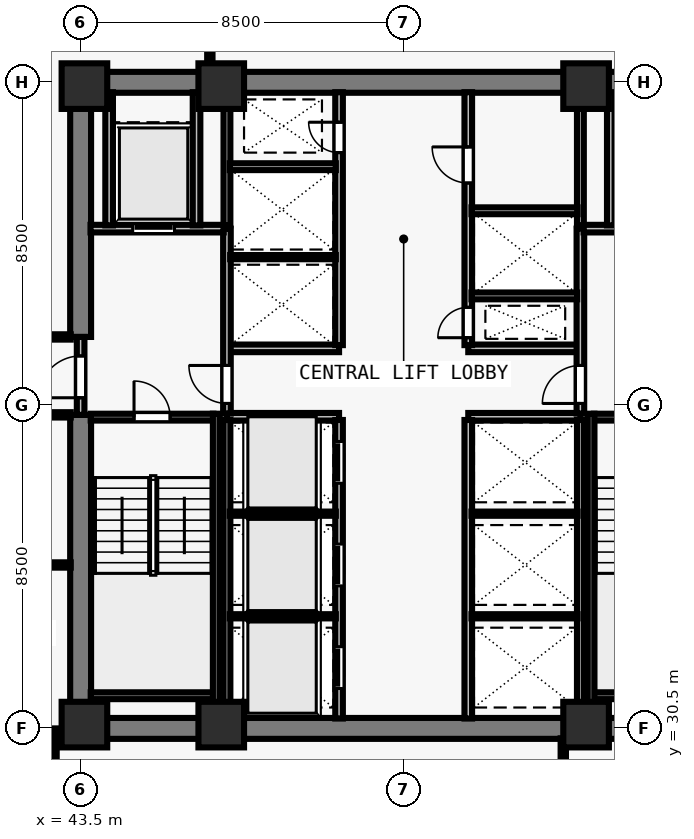
"""IFC4 building model, lengths in metres.
Left out: names, types, materials, properties, quantities, classifications, styles, units other than length and angle.
Written with IfcOpenShell. Run it as: python <this file> out.ifc"""

import sys

from ifc_helpers import new_model, si_unit, direction, frame, frame_2d, origin, origin_2d, place, context, subcontext, project, spatial, rectangle, extrude, element, fill, save


model = new_model("IFC4")
c1 = context("Model", 3, precision=1e-05, world=origin(), true_north=direction((0.0, 1.0)))
c2 = subcontext(c1, "Body", "Model", "MODEL_VIEW")
j1 = project(units=[si_unit("LENGTHUNIT", "METRE"), si_unit("PLANEANGLEUNIT", "RADIAN")], contexts=[c1])
p1 = place(None, origin())
s1 = spatial("IfcSite", under=j1, at=p1, CompositionType="ELEMENT")
p2 = place(p1, origin())
s2 = spatial("IfcBuilding", under=s1, at=p2, CompositionType="ELEMENT")
p3 = place(p2, frame((0.0, 0.0, 72.5)))
s3 = spatial("IfcBuildingStorey", under=s2, at=p3, CompositionType="ELEMENT", Elevation=72.5)
for number, where, z_axis, x_axis in (
    (1, (43.6, 30.6, 0.0), (0.0, 0.0, 1.0), (1.0, 0.0, 0.0)),
    (2, (47.2, 30.6, 0.0), (0.0, 0.0, 1.0), (1.0, 0.0, 0.0)),
    (3, (56.8, 30.6, 0.0), (0.0, 0.0, 1.0), (1.0, 0.0, 0.0)),
    (4, (43.6, 47.4, 0.0), (0.0, 0.0, 1.0), (1.0, 0.0, 0.0)),
    (5, (47.2, 47.4, 0.0), (0.0, 0.0, 1.0), (1.0, 0.0, 0.0)),
    (6, (56.8, 47.4, 0.0), (0.0, 0.0, 1.0), (1.0, 0.0, 0.0)),
):
    element("IfcColumn", number, at=place(p3, frame(where, z_axis=z_axis, x_axis=x_axis)), inside=s3, PredefinedType="COLUMN", context=c2, shape_type="SweptSolid", body=[
        extrude(rectangle(XDim=1.2, YDim=1.2, at=origin_2d()), origin(), (0.0, 0.0, 1.0), 3.5),
    ])
for number, where, z_axis, x_axis in (
    (7, (43.225, 30.5, 0.0), (0.0, 0.0, 1.0), (1.0, 0.0, 0.0)),
    (8, (43.225, 47.5, 0.0), (0.0, 0.0, 1.0), (1.0, 0.0, 0.0)),
):
    element("IfcWall", number, at=place(p3, frame(where, z_axis=z_axis, x_axis=x_axis)), inside=s3, PredefinedType="SHEAR", context=c2, shape_type="SweptSolid", body=[
        extrude(rectangle(XDim=17.55, YDim=0.55, at=frame_2d((8.775, 0.0))), origin(), (0.0, 0.0, 1.0), 3.28),
    ])
p4 = place(p3, frame((43.5, 30.765, 0.0), z_axis=(0.0, 0.0, 1.0), x_axis=(0.0, 1.0, 0.0)))
e9 = element("IfcWall", 9, at=p4, inside=s3, PredefinedType="SHEAR", context=c2, shape_type="SweptSolid", body=[
    extrude(rectangle(XDim=7.985, YDim=0.55, at=frame_2d((3.993, 0.0))), origin(), (0.0, 0.0, 1.0), 3.28),
])
p5 = place(p3, frame((43.5, 40.8, 0.0), z_axis=(0.0, 0.0, 1.0), x_axis=(0.0, 1.0, 0.0)))
e10 = element("IfcWall", 10, at=p5, inside=s3, PredefinedType="SHEAR", context=c2, shape_type="SweptSolid", body=[
    extrude(rectangle(XDim=6.435, YDim=0.55, at=frame_2d((3.218, 0.0))), origin(), (0.0, 0.0, 1.0), 3.28),
])
for number, where, z_axis, x_axis in (
    (11, (47.35, 38.7, 0.0), (0.0, 0.0, 1.0), (1.0, 0.0, 0.0)),
    (12, (47.35, 40.5, 0.0), (0.0, 0.0, 1.0), (1.0, 0.0, 0.0)),
    (13, (53.7, 38.7, 0.0), (0.0, 0.0, 1.0), (1.0, 0.0, 0.0)),
    (14, (53.7, 40.5, 0.0), (0.0, 0.0, 1.0), (1.0, 0.0, 0.0)),
):
    element("IfcWall", number, at=place(p3, frame(where, z_axis=z_axis, x_axis=x_axis)), inside=s3, PredefinedType="SOLIDWALL", context=c2, shape_type="SweptSolid", body=[
        extrude(rectangle(XDim=2.95, YDim=0.2, at=frame_2d((1.475, 0.0))), origin(), (0.0, 0.0, 1.0), 3.28),
    ])
p6 = place(p3, frame((50.3, 30.76, 0.0), z_axis=(0.0, 0.0, 1.0), x_axis=(0.0, 1.0, 0.0)))
e15 = element("IfcWall", 15, at=p6, inside=s3, PredefinedType="SOLIDWALL", context=c2, shape_type="SweptSolid", body=[
    extrude(rectangle(XDim=7.855, YDim=0.2, at=frame_2d((3.927, 0.0))), origin(), (0.0, 0.0, 1.0), 3.28),
])
p7 = place(p6, frame((0.79, 0.0, 0.0)))
e16 = element("IfcOpeningElement", 16, at=p7, cuts=e15, PredefinedType="OPENING", context=c2, shape_type="SweptSolid", body=[
    extrude(rectangle(XDim=1.1, YDim=2.2, at=frame_2d((0.55, 1.1))), frame((0.0, 0.11, 0.0), z_axis=(0.0, -1.0, 0.0), x_axis=(1.0, 0.0, 0.0)), (0.0, 0.0, 1.0), 0.22),
])
p8 = place(p6, frame((3.49, 0.0, 0.0)))
e17 = element("IfcOpeningElement", 17, at=p8, cuts=e15, PredefinedType="OPENING", context=c2, shape_type="SweptSolid", body=[
    extrude(rectangle(XDim=1.1, YDim=2.2, at=frame_2d((0.55, 1.1))), frame((0.0, 0.11, 0.0), z_axis=(0.0, -1.0, 0.0), x_axis=(1.0, 0.0, 0.0)), (0.0, 0.0, 1.0), 0.22),
])
p9 = place(p6, frame((6.19, 0.0, 0.0)))
e18 = element("IfcOpeningElement", 18, at=p9, cuts=e15, PredefinedType="OPENING", context=c2, shape_type="SweptSolid", body=[
    extrude(rectangle(XDim=1.1, YDim=2.2, at=frame_2d((0.55, 1.1))), frame((0.0, 0.11, 0.0), z_axis=(0.0, -1.0, 0.0), x_axis=(1.0, 0.0, 0.0)), (0.0, 0.0, 1.0), 0.22),
])
p10 = place(p3, frame((53.7, 30.76, 0.0), z_axis=(0.0, 0.0, 1.0), x_axis=(0.0, 1.0, 0.0)))
e19 = element("IfcWall", 19, at=p10, inside=s3, PredefinedType="SOLIDWALL", context=c2, shape_type="SweptSolid", body=[
    extrude(rectangle(XDim=7.855, YDim=0.2, at=frame_2d((3.927, 0.0))), origin(), (0.0, 0.0, 1.0), 3.28),
])
p11 = place(p3, frame((50.3, 40.585, 0.0), z_axis=(0.0, 0.0, 1.0), x_axis=(0.0, 1.0, 0.0)))
e20 = element("IfcWall", 20, at=p11, inside=s3, PredefinedType="SOLIDWALL", context=c2, shape_type="SweptSolid", body=[
    extrude(rectangle(XDim=6.655, YDim=0.2, at=frame_2d((3.328, 0.0))), origin(), (0.0, 0.0, 1.0), 3.28),
])
p12 = place(p11, frame((5.065, 0.0, 0.0)))
e21 = element("IfcOpeningElement", 21, at=p12, cuts=e20, PredefinedType="OPENING", context=c2, shape_type="SweptSolid", body=[
    extrude(rectangle(XDim=0.8, YDim=2.08, at=frame_2d((0.4, 1.04))), frame((0.0, 0.11, 0.0), z_axis=(0.0, -1.0, 0.0), x_axis=(1.0, 0.0, 0.0)), (0.0, 0.0, 1.0), 0.22),
])
p13 = place(p3, frame((53.7, 40.585, 0.0), z_axis=(0.0, 0.0, 1.0), x_axis=(0.0, 1.0, 0.0)))
e22 = element("IfcWall", 22, at=p13, inside=s3, PredefinedType="SOLIDWALL", context=c2, shape_type="SweptSolid", body=[
    extrude(rectangle(XDim=6.655, YDim=0.2, at=frame_2d((3.328, 0.0))), origin(), (0.0, 0.0, 1.0), 3.28),
])
p14 = place(p13, frame((0.195, 0.0, 0.0)))
e23 = element("IfcOpeningElement", 23, at=p14, cuts=e22, PredefinedType="OPENING", context=c2, shape_type="SweptSolid", body=[
    extrude(rectangle(XDim=0.8, YDim=2.08, at=frame_2d((0.4, 1.04))), frame((0.0, 0.11, 0.0), z_axis=(0.0, -1.0, 0.0), x_axis=(1.0, 0.0, 0.0)), (0.0, 0.0, 1.0), 0.22),
])
p15 = place(p13, frame((4.265, 0.0, 0.0)))
e24 = element("IfcOpeningElement", 24, at=p15, cuts=e22, PredefinedType="OPENING", context=c2, shape_type="SweptSolid", body=[
    extrude(rectangle(XDim=0.95, YDim=2.12, at=frame_2d((0.475, 1.06))), frame((0.0, 0.11, 0.0), z_axis=(0.0, -1.0, 0.0), x_axis=(1.0, 0.0, 0.0)), (0.0, 0.0, 1.0), 0.22),
])
p16 = place(p3, frame((43.5, 38.75, 0.0), z_axis=(0.0, 0.0, 1.0), x_axis=(0.0, 1.0, 0.0)))
e25 = element("IfcWall", 25, at=p16, inside=s3, PredefinedType="SOLIDWALL", context=c2, shape_type="SweptSolid", body=[
    extrude(rectangle(XDim=2.05, YDim=0.2, at=frame_2d((1.025, 0.0))), origin(), (0.0, 0.0, 1.0), 3.28),
])
p17 = place(p16, frame((0.45, 0.0, 0.0)))
e26 = element("IfcOpeningElement", 26, at=p17, cuts=e25, PredefinedType="OPENING", context=c2, shape_type="SweptSolid", body=[
    extrude(rectangle(XDim=1.1, YDim=2.15, at=frame_2d((0.55, 1.075))), frame((0.0, 0.11, 0.0), z_axis=(0.0, -1.0, 0.0), x_axis=(1.0, 0.0, 0.0)), (0.0, 0.0, 1.0), 0.22),
])
p18 = place(p3, frame((47.35, 38.785, 0.0), z_axis=(0.0, 0.0, 1.0), x_axis=(0.0, 1.0, 0.0)))
e27 = element("IfcWall", 27, at=p18, inside=s3, PredefinedType="SOLIDWALL", context=c2, shape_type="SweptSolid", body=[
    extrude(rectangle(XDim=4.865, YDim=0.2, at=frame_2d((2.433, 0.0))), origin(), (0.0, 0.0, 1.0), 3.28),
])
p19 = place(p18, frame((0.265, 0.0, 0.0)))
e28 = element("IfcOpeningElement", 28, at=p19, cuts=e27, PredefinedType="OPENING", context=c2, shape_type="SweptSolid", body=[
    extrude(rectangle(XDim=1.0, YDim=2.15, at=frame_2d((0.5, 1.075))), frame((0.0, 0.11, 0.0), z_axis=(0.0, -1.0, 0.0), x_axis=(1.0, 0.0, 0.0)), (0.0, 0.0, 1.0), 0.22),
])
p20 = place(p3, frame((43.76, 43.65, 0.0), z_axis=(0.0, 0.0, 1.0), x_axis=(1.0, 0.0, 0.0)))
e29 = element("IfcWall", 29, at=p20, inside=s3, PredefinedType="SOLIDWALL", context=c2, shape_type="SweptSolid", body=[
    extrude(rectangle(XDim=3.505, YDim=0.2, at=frame_2d((1.752, 0.0))), origin(), (0.0, 0.0, 1.0), 3.28),
])
p21 = place(p20, frame((1.11, 0.0, 0.0)))
e30 = element("IfcOpeningElement", 30, at=p21, cuts=e29, PredefinedType="OPENING", context=c2, shape_type="SweptSolid", body=[
    extrude(rectangle(XDim=1.1, YDim=2.2, at=frame_2d((0.55, 1.1))), frame((0.0, 0.11, 0.0), z_axis=(0.0, -1.0, 0.0), x_axis=(1.0, 0.0, 0.0)), (0.0, 0.0, 1.0), 0.22),
])
for number, where, z_axis, x_axis in (
    (31, (46.55, 43.735, 0.0), (0.0, 0.0, 1.0), (0.0, 1.0, 0.0)),
    (32, (44.25, 43.735, 0.0), (0.0, 0.0, 1.0), (0.0, 1.0, 0.0)),
):
    element("IfcWall", number, at=place(p3, frame(where, z_axis=z_axis, x_axis=x_axis)), inside=s3, PredefinedType="SOLIDWALL", context=c2, shape_type="SweptSolid", body=[
        extrude(rectangle(XDim=3.505, YDim=0.2, at=frame_2d((1.752, 0.0))), origin(), (0.0, 0.0, 1.0), 3.28),
    ])
p22 = place(p3, frame((56.65, 38.785, 0.0), z_axis=(0.0, 0.0, 1.0), x_axis=(0.0, 1.0, 0.0)))
e33 = element("IfcWall", 33, at=p22, inside=s3, PredefinedType="SOLIDWALL", context=c2, shape_type="SweptSolid", body=[
    extrude(rectangle(XDim=4.865, YDim=0.2, at=frame_2d((2.433, 0.0))), origin(), (0.0, 0.0, 1.0), 3.28),
])
p23 = place(p22, frame((0.265, 0.0, 0.0)))
e34 = element("IfcOpeningElement", 34, at=p23, cuts=e33, PredefinedType="OPENING", context=c2, shape_type="SweptSolid", body=[
    extrude(rectangle(XDim=1.0, YDim=2.15, at=frame_2d((0.5, 1.075))), frame((0.0, 0.11, 0.0), z_axis=(0.0, -1.0, 0.0), x_axis=(1.0, 0.0, 0.0)), (0.0, 0.0, 1.0), 0.22),
])
p24 = place(p3, frame((56.735, 43.65, 0.0), z_axis=(0.0, 0.0, 1.0), x_axis=(1.0, 0.0, 0.0)))
e35 = element("IfcWall", 35, at=p24, inside=s3, PredefinedType="SOLIDWALL", context=c2, shape_type="SweptSolid", body=[
    extrude(rectangle(XDim=3.505, YDim=0.2, at=frame_2d((1.752, 0.0))), origin(), (0.0, 0.0, 1.0), 3.28),
])
p25 = place(p24, frame((1.295, 0.0, 0.0)))
e36 = element("IfcOpeningElement", 36, at=p25, cuts=e35, PredefinedType="OPENING", context=c2, shape_type="SweptSolid", body=[
    extrude(rectangle(XDim=1.1, YDim=2.2, at=frame_2d((0.55, 1.1))), frame((0.0, 0.11, 0.0), z_axis=(0.0, -1.0, 0.0), x_axis=(1.0, 0.0, 0.0)), (0.0, 0.0, 1.0), 0.22),
])
p26 = place(p3, frame((57.45, 43.735, 0.0), z_axis=(0.0, 0.0, 1.0), x_axis=(0.0, 1.0, 0.0)))
e37 = element("IfcWall", 37, at=p26, inside=s3, PredefinedType="SOLIDWALL", context=c2, shape_type="SweptSolid", body=[
    extrude(rectangle(XDim=3.505, YDim=0.2, at=frame_2d((1.752, 0.0))), origin(), (0.0, 0.0, 1.0), 3.28),
])
p27 = place(p3, frame((47.35, 30.76, 0.0), z_axis=(0.0, 0.0, 1.0), x_axis=(0.0, 1.0, 0.0)))
e38 = element("IfcWall", 38, at=p27, inside=s3, PredefinedType="SOLIDWALL", context=c2, shape_type="SweptSolid", body=[
    extrude(rectangle(XDim=7.855, YDim=0.18, at=frame_2d((3.927, 0.0))), origin(), (0.0, 0.0, 1.0), 3.28),
])
for number, where, z_axis, x_axis in (
    (39, (47.425, 33.45, 0.0), (0.0, 0.0, 1.0), (1.0, 0.0, 0.0)),
    (40, (47.425, 36.15, 0.0), (0.0, 0.0, 1.0), (1.0, 0.0, 0.0)),
):
    element("IfcWall", number, at=place(p3, frame(where, z_axis=z_axis, x_axis=x_axis)), inside=s3, PredefinedType="PARTITIONING", context=c2, shape_type="SweptSolid", body=[
        extrude(rectangle(XDim=2.79, YDim=0.11, at=frame_2d((1.395, 0.0))), origin(), (0.0, 0.0, 1.0), 3.28),
    ])
p28 = place(p3, frame((56.65, 30.76, 0.0), z_axis=(0.0, 0.0, 1.0), x_axis=(0.0, 1.0, 0.0)))
e41 = element("IfcWall", 41, at=p28, inside=s3, PredefinedType="SOLIDWALL", context=c2, shape_type="SweptSolid", body=[
    extrude(rectangle(XDim=7.855, YDim=0.18, at=frame_2d((3.927, 0.0))), origin(), (0.0, 0.0, 1.0), 3.28),
])
for number, where, z_axis, x_axis in (
    (42, (53.785, 33.45, 0.0), (0.0, 0.0, 1.0), (1.0, 0.0, 0.0)),
    (43, (53.785, 36.15, 0.0), (0.0, 0.0, 1.0), (1.0, 0.0, 0.0)),
):
    element("IfcWall", number, at=place(p3, frame(where, z_axis=z_axis, x_axis=x_axis)), inside=s3, PredefinedType="PARTITIONING", context=c2, shape_type="SweptSolid", body=[
        extrude(rectangle(XDim=2.79, YDim=0.11, at=frame_2d((1.395, 0.0))), origin(), (0.0, 0.0, 1.0), 3.28),
    ])
p29 = place(p3, frame((47.35, 43.735, 0.0), z_axis=(0.0, 0.0, 1.0), x_axis=(0.0, 1.0, 0.0)))
e44 = element("IfcWall", 44, at=p29, inside=s3, PredefinedType="SOLIDWALL", context=c2, shape_type="SweptSolid", body=[
    extrude(rectangle(XDim=3.505, YDim=0.18, at=frame_2d((1.752, 0.0))), origin(), (0.0, 0.0, 1.0), 3.28),
])
p30 = place(p3, frame((47.435, 42.9, 0.0), z_axis=(0.0, 0.0, 1.0), x_axis=(1.0, 0.0, 0.0)))
e45 = element("IfcWall", 45, at=p30, inside=s3, PredefinedType="PARTITIONING", context=c2, shape_type="SweptSolid", body=[
    extrude(rectangle(XDim=2.78, YDim=0.11, at=frame_2d((1.39, 0.0))), origin(), (0.0, 0.0, 1.0), 3.28),
])
p31 = place(p3, frame((47.425, 45.28, 0.0), z_axis=(0.0, 0.0, 1.0), x_axis=(1.0, 0.0, 0.0)))
e46 = element("IfcWall", 46, at=p31, inside=s3, PredefinedType="SOLIDWALL", context=c2, shape_type="SweptSolid", body=[
    extrude(rectangle(XDim=2.79, YDim=0.18, at=frame_2d((1.395, 0.0))), origin(), (0.0, 0.0, 1.0), 3.28),
])
p32 = place(p3, frame((56.65, 43.735, 0.0), z_axis=(0.0, 0.0, 1.0), x_axis=(0.0, 1.0, 0.0)))
e47 = element("IfcWall", 47, at=p32, inside=s3, PredefinedType="SOLIDWALL", context=c2, shape_type="SweptSolid", body=[
    extrude(rectangle(XDim=3.505, YDim=0.18, at=frame_2d((1.752, 0.0))), origin(), (0.0, 0.0, 1.0), 3.28),
])
p33 = place(p3, frame((53.785, 41.88, 0.0), z_axis=(0.0, 0.0, 1.0), x_axis=(1.0, 0.0, 0.0)))
e48 = element("IfcWall", 48, at=p33, inside=s3, PredefinedType="SOLIDWALL", context=c2, shape_type="SweptSolid", body=[
    extrude(rectangle(XDim=2.78, YDim=0.18, at=frame_2d((1.39, 0.0))), origin(), (0.0, 0.0, 1.0), 3.28),
])
p34 = place(p3, frame((53.785, 44.12, 0.0), z_axis=(0.0, 0.0, 1.0), x_axis=(1.0, 0.0, 0.0)))
e49 = element("IfcWall", 49, at=p34, inside=s3, PredefinedType="SOLIDWALL", context=c2, shape_type="SweptSolid", body=[
    extrude(rectangle(XDim=2.79, YDim=0.18, at=frame_2d((1.395, 0.0))), origin(), (0.0, 0.0, 1.0), 3.28),
])
for number, where, z_axis, x_axis in (
    (50, (37.255, 38.75, 0.0), (0.0, 0.0, 1.0), (1.0, 0.0, 0.0)),
    (51, (37.255, 40.8, 0.0), (0.0, 0.0, 1.0), (1.0, 0.0, 0.0)),
):
    element("IfcWall", number, at=place(p3, frame(where, z_axis=z_axis, x_axis=x_axis)), inside=s3, PredefinedType="PARTITIONING", context=c2, shape_type="SweptSolid", body=[
        extrude(rectangle(XDim=5.985, YDim=0.14, at=frame_2d((2.993, 0.0))), origin(), (0.0, 0.0, 1.0), 3.28),
    ])
p35 = place(p3, frame((42.8, 23.655, 0.0), z_axis=(0.0, 0.0, 1.0), x_axis=(0.0, 1.0, 0.0)))
e52 = element("IfcWall", 52, at=p35, inside=s3, PredefinedType="PARTITIONING", context=c2, shape_type="SweptSolid", body=[
    extrude(rectangle(XDim=6.845, YDim=0.14, at=frame_2d((3.422, 0.0))), origin(), (0.0, 0.0, 1.0), 2.439),
])
p36 = place(p3, frame((56.2, 23.655, 0.0), z_axis=(0.0, 0.0, 1.0), x_axis=(0.0, 1.0, 0.0)))
e53 = element("IfcWall", 53, at=p36, inside=s3, PredefinedType="PARTITIONING", context=c2, shape_type="SweptSolid", body=[
    extrude(rectangle(XDim=6.585, YDim=0.14, at=frame_2d((3.292, 0.0))), origin(), (0.0, 0.0, 1.0), 2.849),
])
p37 = place(p3, frame((46.9, 47.76, 0.0), z_axis=(0.0, 0.0, 1.0), x_axis=(0.0, 1.0, 0.0)))
e54 = element("IfcWall", 54, at=p37, inside=s3, PredefinedType="PARTITIONING", context=c2, shape_type="SweptSolid", body=[
    extrude(rectangle(XDim=6.585, YDim=0.14, at=frame_2d((3.292, 0.0))), origin(), (0.0, 0.0, 1.0), 3.28),
])
p38 = place(p3, frame((37.255, 34.8, 0.0), z_axis=(0.0, 0.0, 1.0), x_axis=(1.0, 0.0, 0.0)))
e55 = element("IfcWall", 55, at=p38, inside=s3, PredefinedType="PARTITIONING", context=c2, shape_type="SweptSolid", body=[
    extrude(rectangle(XDim=5.985, YDim=0.14, at=frame_2d((2.993, 0.0))), origin(), (0.0, 0.0, 1.0), 3.28),
])
p39 = place(p3, frame((43.765, 38.69, 0.0), z_axis=(0.0, 0.0, 1.0), x_axis=(1.0, 0.0, 0.0)))
e56 = element("IfcWall", 56, at=p39, inside=s3, PredefinedType="SOLIDWALL", context=c2, shape_type="SweptSolid", body=[
    extrude(rectangle(XDim=3.23, YDim=0.18, at=frame_2d((1.615, 0.0))), origin(), (0.0, 0.0, 1.0), 3.28),
])
p40 = place(p39, frame((1.14, 0.0, 0.0)))
e57 = element("IfcOpeningElement", 57, at=p40, cuts=e56, PredefinedType="OPENING", context=c2, shape_type="SweptSolid", body=[
    extrude(rectangle(XDim=0.95, YDim=2.15, at=frame_2d((0.475, 1.075))), frame((0.0, 0.1, 0.0), z_axis=(0.0, -1.0, 0.0), x_axis=(1.0, 0.0, 0.0)), (0.0, 0.0, 1.0), 0.2),
])
p41 = place(p3, frame((43.765, 31.36, 0.0), z_axis=(0.0, 0.0, 1.0), x_axis=(1.0, 0.0, 0.0)))
e58 = element("IfcWall", 58, at=p41, inside=s3, PredefinedType="SOLIDWALL", context=c2, shape_type="SweptSolid", body=[
    extrude(rectangle(XDim=3.23, YDim=0.18, at=frame_2d((1.615, 0.0))), origin(), (0.0, 0.0, 1.0), 3.28),
])
p42 = place(p3, frame((47.07, 38.78, 0.0), z_axis=(0.0, 0.0, 1.0), x_axis=(0.0, -1.0, 0.0)))
e59 = element("IfcWall", 59, at=p42, inside=s3, PredefinedType="SOLIDWALL", context=c2, shape_type="SweptSolid", body=[
    extrude(rectangle(XDim=8.017, YDim=0.18, at=frame_2d((4.009, 0.0))), origin(), (0.0, 0.0, 1.0), 3.28),
])
p43 = place(p3, frame((57.005, 38.69, 0.0), z_axis=(0.0, 0.0, 1.0), x_axis=(1.0, 0.0, 0.0)))
e60 = element("IfcWall", 60, at=p43, inside=s3, PredefinedType="SOLIDWALL", context=c2, shape_type="SweptSolid", body=[
    extrude(rectangle(XDim=3.23, YDim=0.18, at=frame_2d((1.615, 0.0))), origin(), (0.0, 0.0, 1.0), 3.28),
])
p44 = place(p43, frame((1.14, 0.0, 0.0)))
e61 = element("IfcOpeningElement", 61, at=p44, cuts=e60, PredefinedType="OPENING", context=c2, shape_type="SweptSolid", body=[
    extrude(rectangle(XDim=0.95, YDim=2.15, at=frame_2d((0.475, 1.075))), frame((0.0, 0.1, 0.0), z_axis=(0.0, -1.0, 0.0), x_axis=(1.0, 0.0, 0.0)), (0.0, 0.0, 1.0), 0.2),
])
p45 = place(p3, frame((57.005, 31.36, 0.0), z_axis=(0.0, 0.0, 1.0), x_axis=(1.0, 0.0, 0.0)))
e62 = element("IfcWall", 62, at=p45, inside=s3, PredefinedType="SOLIDWALL", context=c2, shape_type="SweptSolid", body=[
    extrude(rectangle(XDim=3.23, YDim=0.18, at=frame_2d((1.615, 0.0))), origin(), (0.0, 0.0, 1.0), 3.28),
])
p46 = place(p3, frame((56.93, 38.78, 0.0), z_axis=(0.0, 0.0, 1.0), x_axis=(0.0, -1.0, 0.0)))
e63 = element("IfcWall", 63, at=p46, inside=s3, PredefinedType="SOLIDWALL", context=c2, shape_type="SweptSolid", body=[
    extrude(rectangle(XDim=8.017, YDim=0.18, at=frame_2d((4.009, 0.0))), origin(), (0.0, 0.0, 1.0), 3.28),
])
p47 = place(p17, origin())
e64 = element("IfcDoor", 64, at=p47, inside=s3, OperationType="SINGLE_SWING_LEFT", PredefinedType="DOOR", context=c2, shape_type="SweptSolid", body=[
    extrude(rectangle(XDim=1.1, YDim=2.15, at=frame_2d((0.55, 1.075))), frame((0.0, 0.025, 0.0), z_axis=(0.0, -1.0, 0.0), x_axis=(1.0, 0.0, 0.0)), (0.0, 0.0, 1.0), 0.05),
])
fill(e26, e64)
p48 = place(p19, origin())
e65 = element("IfcDoor", 65, at=p48, inside=s3, OperationType="SINGLE_SWING_RIGHT", PredefinedType="DOOR", context=c2, shape_type="SweptSolid", body=[
    extrude(rectangle(XDim=1.0, YDim=2.15, at=frame_2d((0.5, 1.075))), frame((0.0, 0.025, 0.0), z_axis=(0.0, -1.0, 0.0), x_axis=(1.0, 0.0, 0.0)), (0.0, 0.0, 1.0), 0.05),
])
fill(e28, e65)
p49 = place(p21, origin())
e66 = element("IfcDoor", 66, at=p49, inside=s3, OperationType="SLIDING_TO_LEFT", PredefinedType="DOOR", context=c2, shape_type="SweptSolid", body=[
    extrude(rectangle(XDim=1.1, YDim=2.2, at=frame_2d((0.55, 1.1))), frame((0.0, 0.025, 0.0), z_axis=(0.0, -1.0, 0.0), x_axis=(1.0, 0.0, 0.0)), (0.0, 0.0, 1.0), 0.05),
])
fill(e30, e66)
p50 = place(p23, origin())
e67 = element("IfcDoor", 67, at=p50, inside=s3, OperationType="SINGLE_SWING_LEFT", PredefinedType="DOOR", context=c2, shape_type="SweptSolid", body=[
    extrude(rectangle(XDim=1.0, YDim=2.15, at=frame_2d((0.5, 1.075))), frame((0.0, 0.025, 0.0), z_axis=(0.0, -1.0, 0.0), x_axis=(1.0, 0.0, 0.0)), (0.0, 0.0, 1.0), 0.05),
])
fill(e34, e67)
p51 = place(p7, origin())
e68 = element("IfcDoor", 68, at=p51, inside=s3, OperationType="SLIDING_TO_LEFT", PredefinedType="DOOR", context=c2, shape_type="SweptSolid", body=[
    extrude(rectangle(XDim=1.1, YDim=2.2, at=frame_2d((0.55, 1.1))), frame((0.0, 0.025, 0.0), z_axis=(0.0, -1.0, 0.0), x_axis=(1.0, 0.0, 0.0)), (0.0, 0.0, 1.0), 0.05),
])
fill(e16, e68)
p52 = place(p8, origin())
e69 = element("IfcDoor", 69, at=p52, inside=s3, OperationType="SLIDING_TO_LEFT", PredefinedType="DOOR", context=c2, shape_type="SweptSolid", body=[
    extrude(rectangle(XDim=1.1, YDim=2.2, at=frame_2d((0.55, 1.1))), frame((0.0, 0.025, 0.0), z_axis=(0.0, -1.0, 0.0), x_axis=(1.0, 0.0, 0.0)), (0.0, 0.0, 1.0), 0.05),
])
fill(e17, e69)
p53 = place(p9, origin())
e70 = element("IfcDoor", 70, at=p53, inside=s3, OperationType="SLIDING_TO_LEFT", PredefinedType="DOOR", context=c2, shape_type="SweptSolid", body=[
    extrude(rectangle(XDim=1.1, YDim=2.2, at=frame_2d((0.55, 1.1))), frame((0.0, 0.025, 0.0), z_axis=(0.0, -1.0, 0.0), x_axis=(1.0, 0.0, 0.0)), (0.0, 0.0, 1.0), 0.05),
])
fill(e18, e70)
p54 = place(p12, origin())
e71 = element("IfcDoor", 71, at=p54, inside=s3, OperationType="SINGLE_SWING_RIGHT", PredefinedType="DOOR", context=c2, shape_type="SweptSolid", body=[
    extrude(rectangle(XDim=0.8, YDim=2.08, at=frame_2d((0.4, 1.04))), frame((0.0, 0.025, 0.0), z_axis=(0.0, -1.0, 0.0), x_axis=(1.0, 0.0, 0.0)), (0.0, 0.0, 1.0), 0.05),
])
fill(e21, e71)
p55 = place(p14, origin())
e72 = element("IfcDoor", 72, at=p55, inside=s3, OperationType="SINGLE_SWING_LEFT", PredefinedType="DOOR", context=c2, shape_type="SweptSolid", body=[
    extrude(rectangle(XDim=0.8, YDim=2.08, at=frame_2d((0.4, 1.04))), frame((0.0, 0.025, 0.0), z_axis=(0.0, -1.0, 0.0), x_axis=(1.0, 0.0, 0.0)), (0.0, 0.0, 1.0), 0.05),
])
fill(e23, e72)
p56 = place(p15, origin())
e73 = element("IfcDoor", 73, at=p56, inside=s3, OperationType="SINGLE_SWING_RIGHT", PredefinedType="DOOR", context=c2, shape_type="SweptSolid", body=[
    extrude(rectangle(XDim=0.95, YDim=2.12, at=frame_2d((0.475, 1.06))), frame((0.0, 0.025, 0.0), z_axis=(0.0, -1.0, 0.0), x_axis=(1.0, 0.0, 0.0)), (0.0, 0.0, 1.0), 0.05),
])
fill(e24, e73)
p57 = place(p40, origin())
e74 = element("IfcDoor", 74, at=p57, inside=s3, OperationType="SINGLE_SWING_LEFT", PredefinedType="DOOR", context=c2, shape_type="SweptSolid", body=[
    extrude(rectangle(XDim=0.95, YDim=2.15, at=frame_2d((0.475, 1.075))), frame((0.0, 0.025, 0.0), z_axis=(0.0, -1.0, 0.0), x_axis=(1.0, 0.0, 0.0)), (0.0, 0.0, 1.0), 0.05),
])
fill(e57, e74)
save(model, sys.argv[1])
